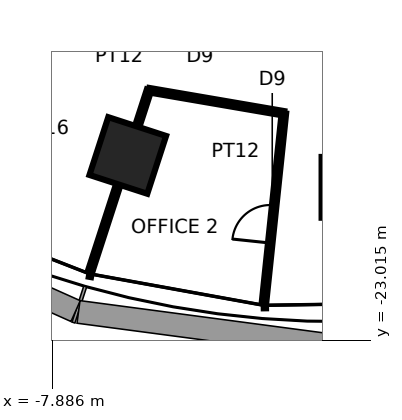
"""IFC4 building model, lengths in metres.
Left out: names, types, materials, properties, quantities, classifications, styles, units other than length and angle.
Written with IfcOpenShell. Run it as: python <this file> out.ifc"""

import sys

from ifc_helpers import new_model, si_unit, direction, frame, frame_2d, origin, origin_2d, place, context, subcontext, project, spatial, rectangle, extrude, element, fill, save


model = new_model("IFC4")
c1 = context("Model", 3, precision=1e-05, world=origin(), true_north=direction((0.0, 1.0)))
c2 = subcontext(c1, "Body", "Model", "MODEL_VIEW")
j1 = project(units=[si_unit("LENGTHUNIT", "METRE"), si_unit("PLANEANGLEUNIT", "RADIAN")], contexts=[c1])
p1 = place(None, origin())
s1 = spatial("IfcSite", under=j1, at=p1, CompositionType="ELEMENT")
p2 = place(p1, origin())
s2 = spatial("IfcBuilding", under=s1, at=p2, CompositionType="ELEMENT")
p3 = place(p2, frame((0.0, 0.0, 108.0)))
s3 = spatial("IfcBuildingStorey", under=s2, at=p3, CompositionType="ELEMENT", Elevation=108.0)
for number, where, z_axis, x_axis in (
    (1, (-5.9, -18.157, 0.0), (0.0, 0.0, 1.0), (-0.309, -0.951, 0.0)),
    (2, (0.0, -18.996, 0.0), (0.0, 0.0, 1.0), (0.0, -1.0, 0.0)),
):
    element("IfcColumn", number, at=place(p3, frame(where, z_axis=z_axis, x_axis=x_axis)), inside=s3, PredefinedType="COLUMN", context=c2, shape_type="SweptSolid", body=[
        extrude(rectangle(XDim=1.6, YDim=1.6, at=origin_2d()), origin(), (0.0, 0.0, 1.0), 3.9),
    ])
p4 = place(p3, frame((-5.341, -16.439, 0.0), z_axis=(0.0, 0.0, 1.0), x_axis=(-0.309040803421, -0.951048779938, 0.0)))
e3 = element("IfcWall", 3, at=p4, inside=s3, PredefinedType="PARTITIONING", context=c2, shape_type="SweptSolid", body=[
    extrude(rectangle(XDim=5.0, YDim=0.12, at=frame_2d((2.5, 0.0))), origin(), (0.0, 0.0, 1.0), 2.94),
])
p5 = place(p3, frame((-1.792, -17.048, 0.0), z_axis=(0.0, 0.0, 1.0), x_axis=(-0.985604186085, 0.169069182206, 0.0)))
e4 = element("IfcWall", 4, at=p5, inside=s3, PredefinedType="PARTITIONING", context=c2, shape_type="SweptSolid", body=[
    extrude(rectangle(XDim=3.601, YDim=0.12, at=frame_2d((1.801, 0.0))), origin(), (0.0, 0.0, 1.0), 3.74),
])
p6 = place(p3, frame((-2.314, -22.021, 0.0), z_axis=(0.0, 0.0, 1.0), x_axis=(0.104539905878, 0.994520692635, 0.0)))
e5 = element("IfcWall", 5, at=p6, inside=s3, PredefinedType="PARTITIONING", context=c2, shape_type="SweptSolid", body=[
    extrude(rectangle(XDim=5.0, YDim=0.12, at=frame_2d((2.5, 0.0))), origin(), (0.0, 0.0, 1.0), 3.74),
])
p7 = place(p6, frame((1.568, 0.0, 0.0)))
e6 = element("IfcOpeningElement", 6, at=p7, cuts=e5, PredefinedType="OPENING", context=c2, shape_type="SweptSolid", body=[
    extrude(rectangle(XDim=1.0, YDim=2.4, at=frame_2d((0.5, 1.2))), frame((0.0, 0.07, 0.0), z_axis=(0.0, -1.0, 0.0), x_axis=(1.0, 0.0, 0.0)), (0.0, 0.0, 1.0), 0.14),
])
p8 = place(p7, origin())
e7 = element("IfcDoor", 7, at=p8, inside=s3, OperationType="SINGLE_SWING_LEFT", PredefinedType="DOOR", context=c2, shape_type="SweptSolid", body=[
    extrude(rectangle(XDim=1.0, YDim=2.4, at=frame_2d((0.5, 1.2))), frame((0.0, 0.025, 0.0), z_axis=(0.0, -1.0, 0.0), x_axis=(1.0, 0.0, 0.0)), (0.0, 0.0, 1.0), 0.05),
])
fill(e6, e7)
save(model, sys.argv[1])
